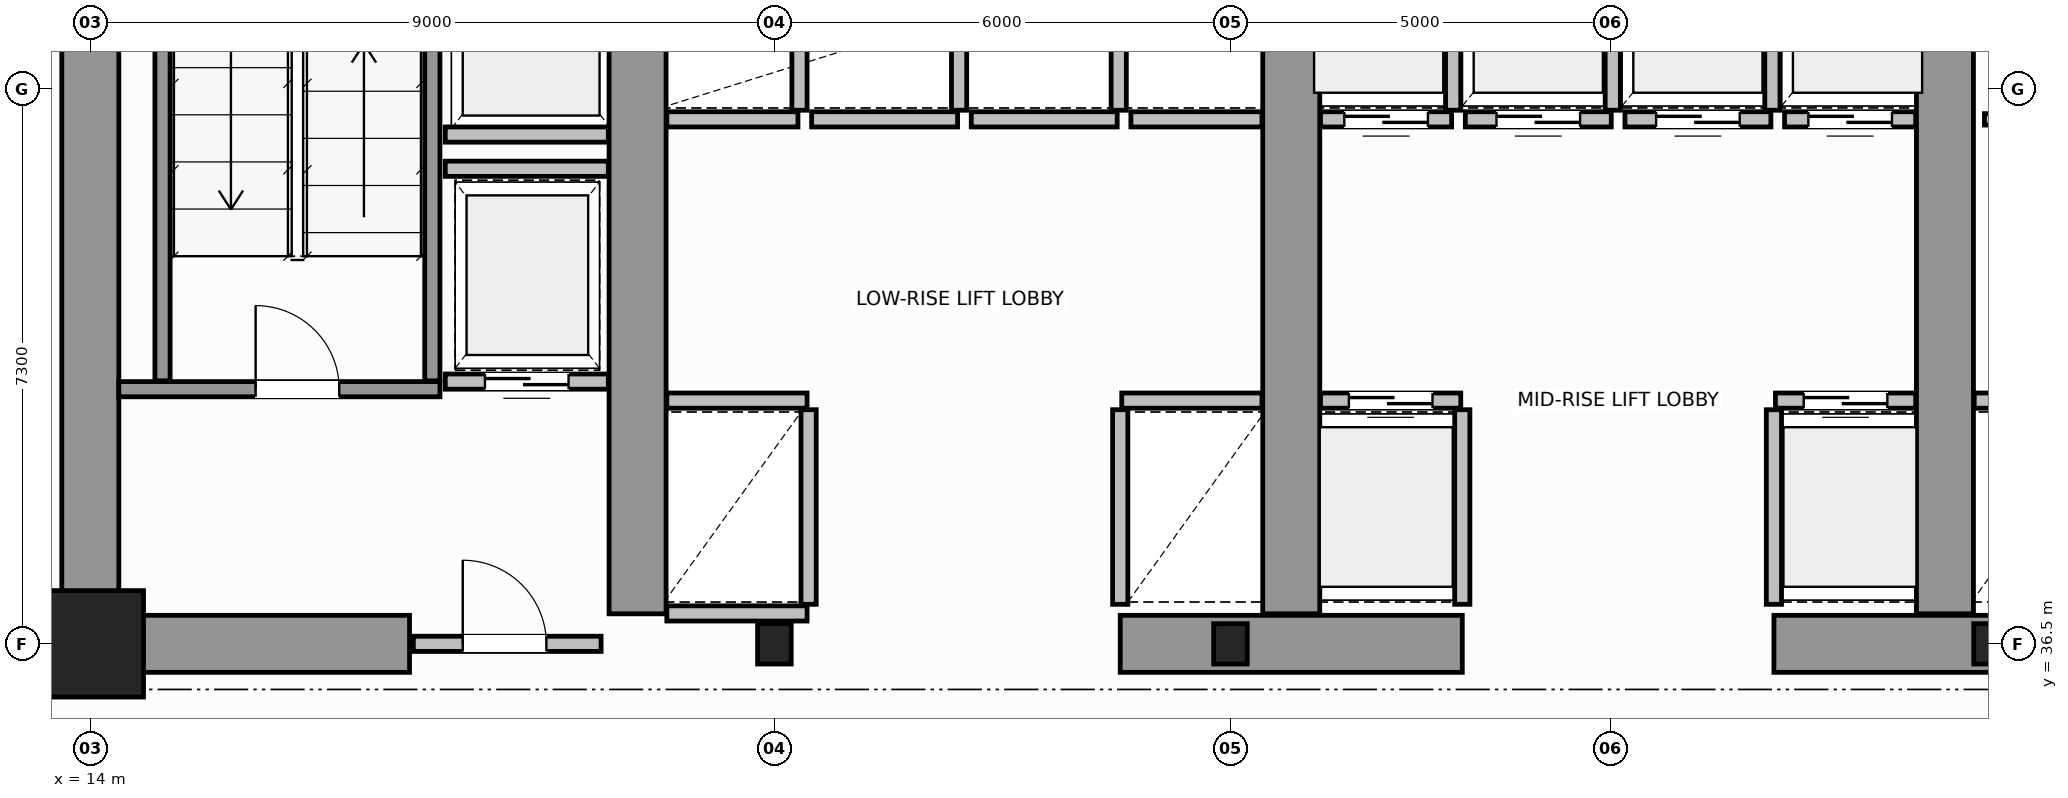
"""IFC4 building model, lengths in metres.
Left out: names, types, materials, properties, quantities, classifications, styles, units other than length and angle.
Written with IfcOpenShell. Run it as: python <this file> out.ifc"""

import sys

from ifc_helpers import new_model, si_unit, direction, frame, frame_2d, origin, origin_2d, place, context, subcontext, project, spatial, rectangle, i_section, extrude, source, transform, mapped, element, fill, save


model = new_model("IFC4")
c1 = context("Model", 3, precision=1e-05, world=origin(), true_north=direction((0.0, 1.0)))
c2 = subcontext(c1, "Body", "Model", "MODEL_VIEW")
j1 = project(units=[si_unit("LENGTHUNIT", "METRE"), si_unit("PLANEANGLEUNIT", "RADIAN")], contexts=[c1])
p1 = place(None, origin())
s1 = spatial("IfcSite", under=j1, at=p1, CompositionType="ELEMENT")
p2 = place(p1, origin())
s2 = spatial("IfcBuilding", under=s1, at=p2, CompositionType="ELEMENT")
p3 = place(p2, frame((0.0, 0.0, 103.4)))
s3 = spatial("IfcBuildingStorey", under=s2, at=p3, CompositionType="ELEMENT", Elevation=103.4)
m1 = source(origin(), c2, "Body", "SweptSolid", [
    extrude(rectangle(XDim=1.4, YDim=1.4, at=origin_2d()), origin(), (0.0, 0.0, 1.0), 3.8),
])
p4 = place(p3, frame((14.0, 36.5, 0.0), z_axis=(0.0, 0.0, 1.0), x_axis=(1.0, 0.0, 0.0)))
e1 = element("IfcColumn", 1, at=p4, inside=s3, PredefinedType="COLUMN", context=c2, shape_type="MappedRepresentation", body=[
    mapped(m1, transform((0.0, 0.0, 0.0), scale=1.0)),
])
m2 = source(origin(), c2, "Body", "SweptSolid", [
    extrude(i_section(OverallWidth=0.442, OverallDepth=0.531, WebThickness=0.065, FlangeThickness=0.076, FilletRadius=0.015, at=origin_2d()), origin(), (0.0, 0.0, 1.0), 3.8),
])
for number, where, z_axis, x_axis in (
    (2, (23.0, 36.5, 0.0), (0.0, 0.0, 1.0), (1.0, 0.0, 0.0)),
    (3, (29.0, 36.5, 0.0), (0.0, 0.0, 1.0), (1.0, 0.0, 0.0)),
    (4, (39.0, 36.5, 0.0), (0.0, 0.0, 1.0), (1.0, 0.0, 0.0)),
):
    element("IfcColumn", number, at=place(p3, frame(where, z_axis=z_axis, x_axis=x_axis)), inside=s3, PredefinedType="COLUMN", context=c2, shape_type="MappedRepresentation", body=[
        mapped(m2, transform((0.0, 0.0, 0.0), scale=1.0)),
    ])
p5 = place(p3, frame((14.0, 36.5, 0.0), z_axis=(0.0, 0.0, 1.0), x_axis=(0.0, 1.0, 0.0)))
e5 = element("IfcWall", 5, at=p5, inside=s3, PredefinedType="SHEAR", context=c2, shape_type="SweptSolid", body=[
    extrude(rectangle(XDim=14.5, YDim=0.75, at=frame_2d((7.25, 0.0))), origin(), (0.0, 0.0, 1.0), 3.8),
])
p6 = place(p3, frame((14.395, 36.5, 0.0), z_axis=(0.0, 0.0, 1.0), x_axis=(1.0, 0.0, 0.0)))
e6 = element("IfcWall", 6, at=p6, inside=s3, PredefinedType="SHEAR", context=c2, shape_type="SweptSolid", body=[
    extrude(rectangle(XDim=3.805, YDim=0.75, at=frame_2d((1.902, 0.0))), origin(), (0.0, 0.0, 1.0), 2.38),
])
for number, where, z_axis, x_axis in (
    (7, (27.55, 36.5, 0.0), (0.0, 0.0, 1.0), (1.0, 0.0, 0.0)),
    (8, (36.15, 36.5, 0.0), (0.0, 0.0, 1.0), (1.0, 0.0, 0.0)),
):
    element("IfcWall", number, at=place(p3, frame(where, z_axis=z_axis, x_axis=x_axis)), inside=s3, PredefinedType="SHEAR", context=c2, shape_type="SweptSolid", body=[
        extrude(rectangle(XDim=4.5, YDim=0.75, at=frame_2d((2.25, 0.0))), origin(), (0.0, 0.0, 1.0), 3.8),
    ])
for number, where, z_axis, x_axis in (
    (9, (21.2, 36.895, 0.0), (0.0, 0.0, 1.0), (0.0, 1.0, 0.0)),
    (10, (29.8, 36.895, 0.0), (0.0, 0.0, 1.0), (0.0, 1.0, 0.0)),
    (11, (38.4, 36.895, 0.0), (0.0, 0.0, 1.0), (0.0, 1.0, 0.0)),
):
    element("IfcWall", number, at=place(p3, frame(where, z_axis=z_axis, x_axis=x_axis)), inside=s3, PredefinedType="SHEAR", context=c2, shape_type="SweptSolid", body=[
        extrude(rectangle(XDim=9.305, YDim=0.75, at=frame_2d((4.652, 0.0))), origin(), (0.0, 0.0, 1.0), 3.8),
    ])
p7 = place(p3, frame((14.375, 39.85, 0.0), z_axis=(0.0, 0.0, 1.0), x_axis=(1.0, 0.0, 0.0)))
e12 = element("IfcWall", 12, at=p7, inside=s3, PredefinedType="SOLIDWALL", context=c2, shape_type="SweptSolid", body=[
    extrude(rectangle(XDim=4.225, YDim=0.2, at=frame_2d((2.113, 0.0))), origin(), (0.0, 0.0, 1.0), 3.8),
])
p8 = place(p7, frame((1.8, 0.0, 0.0)))
e13 = element("IfcOpeningElement", 13, at=p8, cuts=e12, PredefinedType="OPENING", context=c2, shape_type="SweptSolid", body=[
    extrude(rectangle(XDim=1.1, YDim=2.15, at=frame_2d((0.55, 1.075))), frame((0.0, 0.11, 0.0), z_axis=(0.0, -1.0, 0.0), x_axis=(1.0, 0.0, 0.0)), (0.0, 0.0, 1.0), 0.22),
])
for number, where, z_axis, x_axis in (
    (14, (14.95, 39.96, 0.0), (0.0, 0.0, 1.0), (0.0, 1.0, 0.0)),
    (15, (18.5, 39.96, 0.0), (0.0, 0.0, 1.0), (0.0, 1.0, 0.0)),
):
    element("IfcWall", number, at=place(p3, frame(where, z_axis=z_axis, x_axis=x_axis)), inside=s3, PredefinedType="SOLIDWALL", context=c2, shape_type="SweptSolid", body=[
        extrude(rectangle(XDim=9.93, YDim=0.2, at=frame_2d((4.965, 0.0))), origin(), (0.0, 0.0, 1.0), 3.8),
    ])
p9 = place(p3, frame((18.25, 36.5, 0.0), z_axis=(0.0, 0.0, 1.0), x_axis=(1.0, 0.0, 0.0)))
e16 = element("IfcWall", 16, at=p9, inside=s3, PredefinedType="SOLIDWALL", context=c2, shape_type="SweptSolid", body=[
    extrude(rectangle(XDim=2.47, YDim=0.2, at=frame_2d((1.235, 0.0))), origin(), (0.0, 0.0, 1.0), 2.37),
])
p10 = place(p9, frame((0.65, 0.0, 0.0)))
e17 = element("IfcOpeningElement", 17, at=p10, cuts=e16, PredefinedType="OPENING", context=c2, shape_type="SweptSolid", body=[
    extrude(rectangle(XDim=1.1, YDim=2.15, at=frame_2d((0.55, 1.075))), frame((0.0, 0.11, 0.0), z_axis=(0.0, -1.0, 0.0), x_axis=(1.0, 0.0, 0.0)), (0.0, 0.0, 1.0), 0.22),
])
p11 = place(p3, frame((21.585, 39.7, 0.0), z_axis=(0.0, 0.0, 1.0), x_axis=(1.0, 0.0, 0.0)))
e18 = element("IfcWall", 18, at=p11, inside=s3, PredefinedType="SOLIDWALL", context=c2, shape_type="SweptSolid", body=[
    extrude(rectangle(XDim=1.845, YDim=0.2, at=frame_2d((0.922, 0.0))), origin(), (0.0, 0.0, 1.0), 3.58),
])
p12 = place(p3, frame((21.585, 36.9, 0.0), z_axis=(0.0, 0.0, 1.0), x_axis=(1.0, 0.0, 0.0)))
e19 = element("IfcWall", 19, at=p12, inside=s3, PredefinedType="SOLIDWALL", context=c2, shape_type="SweptSolid", body=[
    extrude(rectangle(XDim=1.845, YDim=0.2, at=frame_2d((0.922, 0.0))), origin(), (0.0, 0.0, 1.0), 2.37),
])
p13 = place(p3, frame((23.45, 37.02, 0.0), z_axis=(0.0, 0.0, 1.0), x_axis=(0.0, 1.0, 0.0)))
e20 = element("IfcWall", 20, at=p13, inside=s3, PredefinedType="SOLIDWALL", context=c2, shape_type="SweptSolid", body=[
    extrude(rectangle(XDim=2.56, YDim=0.2, at=frame_2d((1.28, 0.0))), origin(), (0.0, 0.0, 1.0), 3.58),
])
p14 = place(p3, frame((27.57, 39.7, 0.0), z_axis=(0.0, 0.0, 1.0), x_axis=(1.0, 0.0, 0.0)))
e21 = element("IfcWall", 21, at=p14, inside=s3, PredefinedType="SOLIDWALL", context=c2, shape_type="SweptSolid", body=[
    extrude(rectangle(XDim=1.845, YDim=0.2, at=frame_2d((0.922, 0.0))), origin(), (0.0, 0.0, 1.0), 3.58),
])
p15 = place(p3, frame((27.55, 37.02, 0.0), z_axis=(0.0, 0.0, 1.0), x_axis=(0.0, 1.0, 0.0)))
e22 = element("IfcWall", 22, at=p15, inside=s3, PredefinedType="SOLIDWALL", context=c2, shape_type="SweptSolid", body=[
    extrude(rectangle(XDim=2.56, YDim=0.2, at=frame_2d((1.28, 0.0))), origin(), (0.0, 0.0, 1.0), 3.58),
])
p16 = place(p3, frame((21.585, 43.4, 0.0), z_axis=(0.0, 0.0, 1.0), x_axis=(1.0, 0.0, 0.0)))
e23 = element("IfcWall", 23, at=p16, inside=s3, PredefinedType="SOLIDWALL", context=c2, shape_type="SweptSolid", body=[
    extrude(rectangle(XDim=1.725, YDim=0.2, at=frame_2d((0.863, 0.0))), origin(), (0.0, 0.0, 1.0), 3.58),
])
p17 = place(p3, frame((23.33, 43.52, 0.0), z_axis=(0.0, 0.0, 1.0), x_axis=(0.0, 1.0, 0.0)))
e24 = element("IfcWall", 24, at=p17, inside=s3, PredefinedType="SOLIDWALL", context=c2, shape_type="SweptSolid", body=[
    extrude(rectangle(XDim=2.56, YDim=0.2, at=frame_2d((1.28, 0.0))), origin(), (0.0, 0.0, 1.0), 3.58),
])
p18 = place(p3, frame((23.49, 43.4, 0.0), z_axis=(0.0, 0.0, 1.0), x_axis=(1.0, 0.0, 0.0)))
e25 = element("IfcWall", 25, at=p18, inside=s3, PredefinedType="SOLIDWALL", context=c2, shape_type="SweptSolid", body=[
    extrude(rectangle(XDim=1.92, YDim=0.2, at=frame_2d((0.96, 0.0))), origin(), (0.0, 0.0, 1.0), 3.58),
])
p19 = place(p3, frame((25.43, 43.52, 0.0), z_axis=(0.0, 0.0, 1.0), x_axis=(0.0, 1.0, 0.0)))
e26 = element("IfcWall", 26, at=p19, inside=s3, PredefinedType="SOLIDWALL", context=c2, shape_type="SweptSolid", body=[
    extrude(rectangle(XDim=2.56, YDim=0.2, at=frame_2d((1.28, 0.0))), origin(), (0.0, 0.0, 1.0), 3.58),
])
p20 = place(p3, frame((25.59, 43.4, 0.0), z_axis=(0.0, 0.0, 1.0), x_axis=(1.0, 0.0, 0.0)))
e27 = element("IfcWall", 27, at=p20, inside=s3, PredefinedType="SOLIDWALL", context=c2, shape_type="SweptSolid", body=[
    extrude(rectangle(XDim=1.92, YDim=0.2, at=frame_2d((0.96, 0.0))), origin(), (0.0, 0.0, 1.0), 3.58),
])
p21 = place(p3, frame((27.53, 43.52, 0.0), z_axis=(0.0, 0.0, 1.0), x_axis=(0.0, 1.0, 0.0)))
e28 = element("IfcWall", 28, at=p21, inside=s3, PredefinedType="SOLIDWALL", context=c2, shape_type="SweptSolid", body=[
    extrude(rectangle(XDim=2.56, YDim=0.2, at=frame_2d((1.28, 0.0))), origin(), (0.0, 0.0, 1.0), 3.58),
])
p22 = place(p3, frame((27.69, 43.4, 0.0), z_axis=(0.0, 0.0, 1.0), x_axis=(1.0, 0.0, 0.0)))
e29 = element("IfcWall", 29, at=p22, inside=s3, PredefinedType="SOLIDWALL", context=c2, shape_type="SweptSolid", body=[
    extrude(rectangle(XDim=1.725, YDim=0.2, at=frame_2d((0.863, 0.0))), origin(), (0.0, 0.0, 1.0), 3.58),
])
p23 = place(p3, frame((30.185, 39.7, 0.0), z_axis=(0.0, 0.0, 1.0), x_axis=(1.0, 0.0, 0.0)))
e30 = element("IfcWall", 30, at=p23, inside=s3, PredefinedType="SOLIDWALL", context=c2, shape_type="SweptSolid", body=[
    extrude(rectangle(XDim=1.845, YDim=0.2, at=frame_2d((0.922, 0.0))), origin(), (0.0, 0.0, 1.0), 3.58),
])
p24 = place(p23, frame((0.373, 0.0, 0.0)))
e31 = element("IfcOpeningElement", 31, at=p24, cuts=e30, PredefinedType="OPENING", context=c2, shape_type="SweptSolid", body=[
    extrude(rectangle(XDim=1.1, YDim=2.15, at=frame_2d((0.55, 1.075))), frame((0.0, 0.11, 0.0), z_axis=(0.0, -1.0, 0.0), x_axis=(1.0, 0.0, 0.0)), (0.0, 0.0, 1.0), 0.22),
])
p25 = place(p3, frame((32.05, 37.02, 0.0), z_axis=(0.0, 0.0, 1.0), x_axis=(0.0, 1.0, 0.0)))
e32 = element("IfcWall", 32, at=p25, inside=s3, PredefinedType="SOLIDWALL", context=c2, shape_type="SweptSolid", body=[
    extrude(rectangle(XDim=2.56, YDim=0.2, at=frame_2d((1.28, 0.0))), origin(), (0.0, 0.0, 1.0), 3.58),
])
p26 = place(p3, frame((36.17, 39.7, 0.0), z_axis=(0.0, 0.0, 1.0), x_axis=(1.0, 0.0, 0.0)))
e33 = element("IfcWall", 33, at=p26, inside=s3, PredefinedType="SOLIDWALL", context=c2, shape_type="SweptSolid", body=[
    extrude(rectangle(XDim=1.845, YDim=0.2, at=frame_2d((0.922, 0.0))), origin(), (0.0, 0.0, 1.0), 3.58),
])
p27 = place(p26, frame((0.372, 0.0, 0.0)))
e34 = element("IfcOpeningElement", 34, at=p27, cuts=e33, PredefinedType="OPENING", context=c2, shape_type="SweptSolid", body=[
    extrude(rectangle(XDim=1.1, YDim=2.15, at=frame_2d((0.55, 1.075))), frame((0.0, 0.11, 0.0), z_axis=(0.0, -1.0, 0.0), x_axis=(1.0, 0.0, 0.0)), (0.0, 0.0, 1.0), 0.22),
])
p28 = place(p3, frame((36.15, 37.02, 0.0), z_axis=(0.0, 0.0, 1.0), x_axis=(0.0, 1.0, 0.0)))
e35 = element("IfcWall", 35, at=p28, inside=s3, PredefinedType="SOLIDWALL", context=c2, shape_type="SweptSolid", body=[
    extrude(rectangle(XDim=2.56, YDim=0.2, at=frame_2d((1.28, 0.0))), origin(), (0.0, 0.0, 1.0), 3.58),
])
p29 = place(p3, frame((30.185, 43.4, 0.0), z_axis=(0.0, 0.0, 1.0), x_axis=(1.0, 0.0, 0.0)))
e36 = element("IfcWall", 36, at=p29, inside=s3, PredefinedType="SOLIDWALL", context=c2, shape_type="SweptSolid", body=[
    extrude(rectangle(XDim=1.725, YDim=0.2, at=frame_2d((0.862, 0.0))), origin(), (0.0, 0.0, 1.0), 3.58),
])
p30 = place(p29, frame((0.313, 0.0, 0.0)))
e37 = element("IfcOpeningElement", 37, at=p30, cuts=e36, PredefinedType="OPENING", context=c2, shape_type="SweptSolid", body=[
    extrude(rectangle(XDim=1.1, YDim=2.15, at=frame_2d((0.55, 1.075))), frame((0.0, 0.11, 0.0), z_axis=(0.0, -1.0, 0.0), x_axis=(1.0, 0.0, 0.0)), (0.0, 0.0, 1.0), 0.22),
])
p31 = place(p3, frame((31.93, 43.52, 0.0), z_axis=(0.0, 0.0, 1.0), x_axis=(0.0, 1.0, 0.0)))
e38 = element("IfcWall", 38, at=p31, inside=s3, PredefinedType="SOLIDWALL", context=c2, shape_type="SweptSolid", body=[
    extrude(rectangle(XDim=2.56, YDim=0.2, at=frame_2d((1.28, 0.0))), origin(), (0.0, 0.0, 1.0), 3.58),
])
p32 = place(p3, frame((32.09, 43.4, 0.0), z_axis=(0.0, 0.0, 1.0), x_axis=(1.0, 0.0, 0.0)))
e39 = element("IfcWall", 39, at=p32, inside=s3, PredefinedType="SOLIDWALL", context=c2, shape_type="SweptSolid", body=[
    extrude(rectangle(XDim=1.92, YDim=0.2, at=frame_2d((0.96, 0.0))), origin(), (0.0, 0.0, 1.0), 3.58),
])
p33 = place(p32, frame((0.41, 0.0, 0.0)))
e40 = element("IfcOpeningElement", 40, at=p33, cuts=e39, PredefinedType="OPENING", context=c2, shape_type="SweptSolid", body=[
    extrude(rectangle(XDim=1.1, YDim=2.15, at=frame_2d((0.55, 1.075))), frame((0.0, 0.11, 0.0), z_axis=(0.0, -1.0, 0.0), x_axis=(1.0, 0.0, 0.0)), (0.0, 0.0, 1.0), 0.22),
])
p34 = place(p3, frame((34.03, 43.52, 0.0), z_axis=(0.0, 0.0, 1.0), x_axis=(0.0, 1.0, 0.0)))
e41 = element("IfcWall", 41, at=p34, inside=s3, PredefinedType="SOLIDWALL", context=c2, shape_type="SweptSolid", body=[
    extrude(rectangle(XDim=2.56, YDim=0.2, at=frame_2d((1.28, 0.0))), origin(), (0.0, 0.0, 1.0), 3.58),
])
p35 = place(p3, frame((34.19, 43.4, 0.0), z_axis=(0.0, 0.0, 1.0), x_axis=(1.0, 0.0, 0.0)))
e42 = element("IfcWall", 42, at=p35, inside=s3, PredefinedType="SOLIDWALL", context=c2, shape_type="SweptSolid", body=[
    extrude(rectangle(XDim=1.92, YDim=0.2, at=frame_2d((0.96, 0.0))), origin(), (0.0, 0.0, 1.0), 3.58),
])
p36 = place(p35, frame((0.41, 0.0, 0.0)))
e43 = element("IfcOpeningElement", 43, at=p36, cuts=e42, PredefinedType="OPENING", context=c2, shape_type="SweptSolid", body=[
    extrude(rectangle(XDim=1.1, YDim=2.15, at=frame_2d((0.55, 1.075))), frame((0.0, 0.11, 0.0), z_axis=(0.0, -1.0, 0.0), x_axis=(1.0, 0.0, 0.0)), (0.0, 0.0, 1.0), 0.22),
])
p37 = place(p3, frame((36.13, 43.52, 0.0), z_axis=(0.0, 0.0, 1.0), x_axis=(0.0, 1.0, 0.0)))
e44 = element("IfcWall", 44, at=p37, inside=s3, PredefinedType="SOLIDWALL", context=c2, shape_type="SweptSolid", body=[
    extrude(rectangle(XDim=2.56, YDim=0.2, at=frame_2d((1.28, 0.0))), origin(), (0.0, 0.0, 1.0), 3.58),
])
p38 = place(p3, frame((36.29, 43.4, 0.0), z_axis=(0.0, 0.0, 1.0), x_axis=(1.0, 0.0, 0.0)))
e45 = element("IfcWall", 45, at=p38, inside=s3, PredefinedType="SOLIDWALL", context=c2, shape_type="SweptSolid", body=[
    extrude(rectangle(XDim=1.725, YDim=0.2, at=frame_2d((0.862, 0.0))), origin(), (0.0, 0.0, 1.0), 3.58),
])
p39 = place(p38, frame((0.313, 0.0, 0.0)))
e46 = element("IfcOpeningElement", 46, at=p39, cuts=e45, PredefinedType="OPENING", context=c2, shape_type="SweptSolid", body=[
    extrude(rectangle(XDim=1.1, YDim=2.15, at=frame_2d((0.55, 1.075))), frame((0.0, 0.11, 0.0), z_axis=(0.0, -1.0, 0.0), x_axis=(1.0, 0.0, 0.0)), (0.0, 0.0, 1.0), 0.22),
])
p40 = place(p3, frame((38.785, 39.7, 0.0), z_axis=(0.0, 0.0, 1.0), x_axis=(1.0, 0.0, 0.0)))
e47 = element("IfcWall", 47, at=p40, inside=s3, PredefinedType="SOLIDWALL", context=c2, shape_type="SweptSolid", body=[
    extrude(rectangle(XDim=1.845, YDim=0.2, at=frame_2d((0.922, 0.0))), origin(), (0.0, 0.0, 1.0), 3.58),
])
p41 = place(p3, frame((18.67, 43.2, 0.0), z_axis=(0.0, 0.0, 1.0), x_axis=(1.0, 0.0, 0.0)))
e48 = element("IfcWall", 48, at=p41, inside=s3, PredefinedType="SOLIDWALL", context=c2, shape_type="SweptSolid", body=[
    extrude(rectangle(XDim=2.145, YDim=0.2, at=frame_2d((1.073, 0.0))), origin(), (0.0, 0.0, 1.0), 3.58),
])
p42 = place(p3, frame((18.67, 39.95, 0.0), z_axis=(0.0, 0.0, 1.0), x_axis=(1.0, 0.0, 0.0)))
e49 = element("IfcWall", 49, at=p42, inside=s3, PredefinedType="SOLIDWALL", context=c2, shape_type="SweptSolid", body=[
    extrude(rectangle(XDim=2.145, YDim=0.2, at=frame_2d((1.073, 0.0))), origin(), (0.0, 0.0, 1.0), 3.58),
])
p43 = place(p42, frame((0.522, 0.0, 0.0)))
e50 = element("IfcOpeningElement", 50, at=p43, cuts=e49, PredefinedType="OPENING", context=c2, shape_type="SweptSolid", body=[
    extrude(rectangle(XDim=1.1, YDim=2.15, at=frame_2d((0.55, 1.075))), frame((0.0, 0.11, 0.0), z_axis=(0.0, -1.0, 0.0), x_axis=(1.0, 0.0, 0.0)), (0.0, 0.0, 1.0), 0.22),
])
p44 = place(p3, frame((18.67, 42.75, 0.0), z_axis=(0.0, 0.0, 1.0), x_axis=(1.0, 0.0, 0.0)))
e51 = element("IfcWall", 51, at=p44, inside=s3, PredefinedType="SOLIDWALL", context=c2, shape_type="SweptSolid", body=[
    extrude(rectangle(XDim=2.145, YDim=0.2, at=frame_2d((1.073, 0.0))), origin(), (0.0, 0.0, 1.0), 3.58),
])
p45 = place(p3, frame((38.92, 43.4, 0.0), z_axis=(0.0, 0.0, 1.0), x_axis=(1.0, 0.0, 0.0)))
e52 = element("IfcWall", 52, at=p45, inside=s3, PredefinedType="PARTITIONING", context=c2, shape_type="SweptSolid", body=[
    extrude(rectangle(XDim=1.6, YDim=0.15, at=frame_2d((0.8, 0.0))), origin(), (0.0, 0.0, 1.0), 3.58),
])
p46 = place(p45, frame((0.35, 0.0, 0.0)))
e53 = element("IfcOpeningElement", 53, at=p46, cuts=e52, PredefinedType="OPENING", context=c2, shape_type="SweptSolid", body=[
    extrude(rectangle(XDim=0.9, YDim=2.1, at=frame_2d((0.45, 1.05))), frame((0.0, 0.085, 0.0), z_axis=(0.0, -1.0, 0.0), x_axis=(1.0, 0.0, 0.0)), (0.0, 0.0, 1.0), 0.17),
])
p47 = place(p3, frame((7.274, 36.48, 0.0), z_axis=(0.0, 0.0, 1.0), x_axis=(1.0, 0.0, 0.0)))
e54 = element("IfcWall", 54, at=p47, inside=s3, PredefinedType="PARTITIONING", context=c2, shape_type="SweptSolid", body=[
    extrude(rectangle(XDim=6.666, YDim=0.12, at=frame_2d((3.333, 0.0))), origin(), (0.0, 0.0, 1.0), 2.87),
])
p48 = place(p47, frame((2.883, 0.0, 0.0)))
e55 = element("IfcOpeningElement", 55, at=p48, cuts=e54, PredefinedType="OPENING", context=c2, shape_type="SweptSolid", body=[
    extrude(rectangle(XDim=0.9, YDim=2.15, at=frame_2d((0.45, 1.075))), frame((0.0, 0.07, 0.0), z_axis=(0.0, -1.0, 0.0), x_axis=(1.0, 0.0, 0.0)), (0.0, 0.0, 1.0), 0.14),
])
m3 = source(origin(), c2, "Body", "SweptSolid", [
    extrude(rectangle(XDim=1.1, YDim=2.15, at=frame_2d((0.55, 1.075))), frame((0.0, 0.025, 0.0), z_axis=(0.0, -1.0, 0.0), x_axis=(1.0, 0.0, 0.0)), (0.0, 0.0, 1.0), 0.05),
])
p49 = place(p8, origin())
e56 = element("IfcDoor", 56, at=p49, inside=s3, OperationType="SINGLE_SWING_LEFT", PredefinedType="DOOR", context=c2, shape_type="MappedRepresentation", body=[
    mapped(m3, transform((0.0, 0.0, 0.0), scale=1.0)),
])
fill(e13, e56)
p50 = place(p10, origin())
e57 = element("IfcDoor", 57, at=p50, inside=s3, OperationType="SINGLE_SWING_RIGHT", PredefinedType="DOOR", context=c2, shape_type="MappedRepresentation", body=[
    mapped(m3, transform((0.0, 0.0, 0.0), scale=1.0)),
])
fill(e17, e57)
p51 = place(p24, origin())
e58 = element("IfcDoor", 58, at=p51, inside=s3, OperationType="DOUBLE_DOOR_SLIDING", PredefinedType="DOOR", context=c2, shape_type="MappedRepresentation", body=[
    mapped(m3, transform((0.0, 0.0, 0.0), scale=1.0)),
])
fill(e31, e58)
p52 = place(p27, origin())
e59 = element("IfcDoor", 59, at=p52, inside=s3, OperationType="DOUBLE_DOOR_SLIDING", PredefinedType="DOOR", context=c2, shape_type="MappedRepresentation", body=[
    mapped(m3, transform((0.0, 0.0, 0.0), scale=1.0)),
])
fill(e34, e59)
p53 = place(p30, origin())
e60 = element("IfcDoor", 60, at=p53, inside=s3, OperationType="DOUBLE_DOOR_SLIDING", PredefinedType="DOOR", context=c2, shape_type="MappedRepresentation", body=[
    mapped(m3, transform((0.0, 0.0, 0.0), scale=1.0)),
])
fill(e37, e60)
p54 = place(p33, origin())
e61 = element("IfcDoor", 61, at=p54, inside=s3, OperationType="DOUBLE_DOOR_SLIDING", PredefinedType="DOOR", context=c2, shape_type="MappedRepresentation", body=[
    mapped(m3, transform((0.0, 0.0, 0.0), scale=1.0)),
])
fill(e40, e61)
p55 = place(p36, origin())
e62 = element("IfcDoor", 62, at=p55, inside=s3, OperationType="DOUBLE_DOOR_SLIDING", PredefinedType="DOOR", context=c2, shape_type="MappedRepresentation", body=[
    mapped(m3, transform((0.0, 0.0, 0.0), scale=1.0)),
])
fill(e43, e62)
p56 = place(p39, origin())
e63 = element("IfcDoor", 63, at=p56, inside=s3, OperationType="DOUBLE_DOOR_SLIDING", PredefinedType="DOOR", context=c2, shape_type="MappedRepresentation", body=[
    mapped(m3, transform((0.0, 0.0, 0.0), scale=1.0)),
])
fill(e46, e63)
p57 = place(p43, origin())
e64 = element("IfcDoor", 64, at=p57, inside=s3, OperationType="DOUBLE_DOOR_SLIDING", PredefinedType="DOOR", context=c2, shape_type="MappedRepresentation", body=[
    mapped(m3, transform((0.0, 0.0, 0.0), scale=1.0)),
])
fill(e50, e64)
save(model, sys.argv[1])
